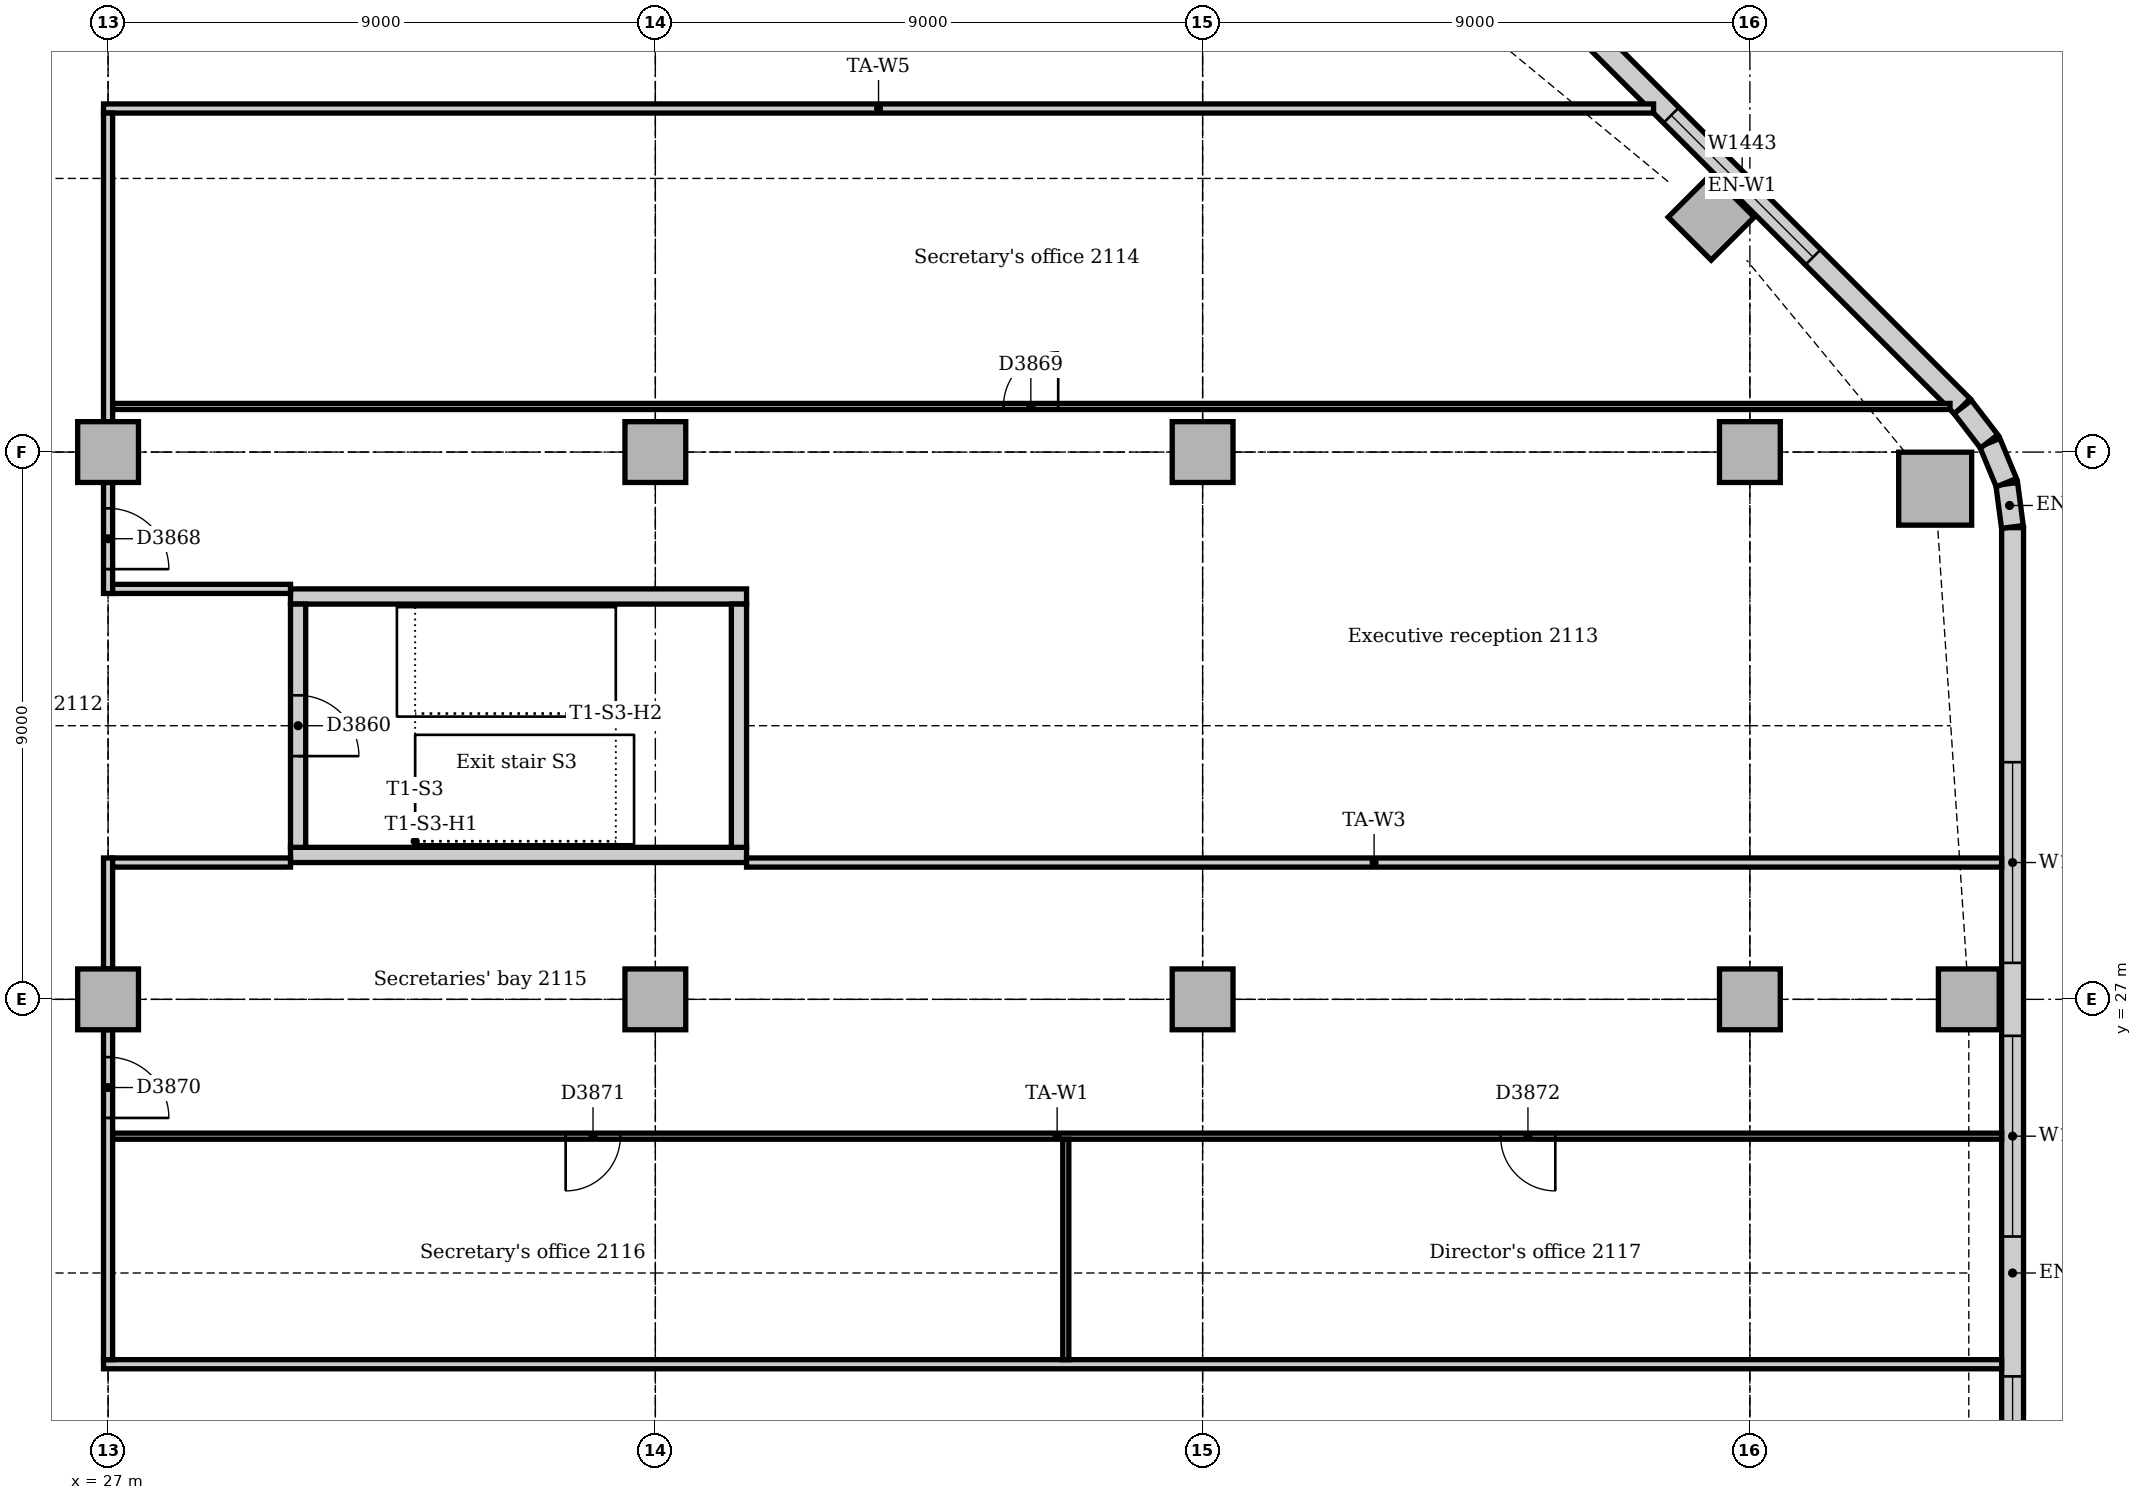
"""IFC4 building model, lengths in metres.
Left out: names, types, materials, properties, quantities, classifications, styles, units other than length and angle.
Written with IfcOpenShell. Run it as: python <this file> out.ifc"""

import sys

from ifc_helpers import new_model, si_unit, direction, frame, frame_2d, origin, origin_2d, place, context, subcontext, project, spatial, rectangle, extrude, element, fill, save


model = new_model("IFC4")
c1 = context("Model", 3, precision=1e-05, world=origin(), true_north=direction((0.0, 1.0)))
c2 = subcontext(c1, "Body", "Model", "MODEL_VIEW")
j1 = project(units=[si_unit("LENGTHUNIT", "METRE"), si_unit("PLANEANGLEUNIT", "RADIAN")], contexts=[c1])
p1 = place(None, origin())
s1 = spatial("IfcSite", under=j1, at=p1, CompositionType="ELEMENT")
p2 = place(p1, origin())
s2 = spatial("IfcBuilding", under=s1, at=p2, CompositionType="ELEMENT")
p3 = place(p2, frame((0.0, 0.0, 91.0)))
s3 = spatial("IfcBuildingStorey", under=s2, at=p3, CompositionType="ELEMENT", Elevation=91.0)
for number, where, z_axis, x_axis in (
    (1, (30.0, 29.375, 0.0), (0.0, 0.0, 1.0), (1.0, 0.0, 0.0)),
    (2, (37.5, 33.625, 0.0), (0.0, 0.0, 1.0), (-1.0, 0.0, 0.0)),
):
    element("IfcWall", number, at=place(p3, frame(where, z_axis=z_axis, x_axis=x_axis)), inside=s3, PredefinedType="SOLIDWALL", context=c2, shape_type="SweptSolid", body=[
        extrude(rectangle(XDim=7.5, YDim=0.25, at=frame_2d((3.75, 0.0))), origin(), (0.0, 0.0, 1.0), 4.0),
    ])
p4 = place(p3, frame((37.375, 29.5, 0.0), z_axis=(0.0, 0.0, 1.0), x_axis=(0.0, 1.0, 0.0)))
e3 = element("IfcWall", 3, at=p4, inside=s3, PredefinedType="SOLIDWALL", context=c2, shape_type="SweptSolid", body=[
    extrude(rectangle(XDim=4.0, YDim=0.25, at=frame_2d((2.0, 0.0))), origin(), (0.0, 0.0, 1.0), 4.0),
])
p5 = place(p3, frame((30.125, 33.5, 0.0), z_axis=(0.0, 0.0, 1.0), x_axis=(0.0, -1.0, 0.0)))
e4 = element("IfcWall", 4, at=p5, inside=s3, PredefinedType="SOLIDWALL", context=c2, shape_type="SweptSolid", body=[
    extrude(rectangle(XDim=4.0, YDim=0.25, at=frame_2d((2.0, 0.0))), origin(), (0.0, 0.0, 1.0), 4.0),
])
p6 = place(p5, frame((1.5, 0.0, 0.0)))
e5 = element("IfcOpeningElement", 5, at=p6, cuts=e4, PredefinedType="OPENING", context=c2, shape_type="SweptSolid", body=[
    extrude(rectangle(XDim=1.0, YDim=2.1, at=frame_2d((0.5, 1.05))), frame((0.0, 0.135, 0.0), z_axis=(0.0, -1.0, 0.0), x_axis=(1.0, 0.0, 0.0)), (0.0, 0.0, 1.0), 0.27),
])
p7 = place(p3, frame((57.047, 35.398, 0.0), z_axis=(0.0, 0.0, 1.0), x_axis=(1.0, 0.0, 0.0)))
e6 = element("IfcColumn", 6, at=p7, inside=s3, PredefinedType="COLUMN", context=c2, shape_type="SweptSolid", body=[
    extrude(rectangle(XDim=1.2, YDim=1.2, at=origin_2d()), origin(), (0.0, 0.0, 1.0), 3.7),
])
for number, where, z_axis, x_axis in (
    (7, (57.6, 27.0, 0.0), (0.0, 0.0, 1.0), (1.0, 0.0, 0.0)),
    (8, (53.364, 39.864, 0.0), (0.0, 0.0, 1.0), (0.707, 0.707, 0.0)),
    (9, (27.0, 27.0, 0.0), (0.0, 0.0, 1.0), (1.0, 0.0, 0.0)),
    (10, (27.0, 36.0, 0.0), (0.0, 0.0, 1.0), (1.0, 0.0, 0.0)),
    (11, (36.0, 27.0, 0.0), (0.0, 0.0, 1.0), (1.0, 0.0, 0.0)),
    (12, (36.0, 36.0, 0.0), (0.0, 0.0, 1.0), (1.0, 0.0, 0.0)),
    (13, (45.0, 27.0, 0.0), (0.0, 0.0, 1.0), (1.0, 0.0, 0.0)),
    (14, (45.0, 36.0, 0.0), (0.0, 0.0, 1.0), (1.0, 0.0, 0.0)),
    (15, (54.0, 27.0, 0.0), (0.0, 0.0, 1.0), (1.0, 0.0, 0.0)),
    (16, (54.0, 36.0, 0.0), (0.0, 0.0, 1.0), (1.0, 0.0, 0.0)),
):
    element("IfcColumn", number, at=place(p3, frame(where, z_axis=z_axis, x_axis=x_axis)), inside=s3, PredefinedType="COLUMN", context=c2, shape_type="SweptSolid", body=[
        extrude(rectangle(XDim=1.0, YDim=1.0, at=origin_2d()), origin(), (0.0, 0.0, 1.0), 3.7),
    ])
p8 = place(p3, frame((58.32, 10.243, 0.0), z_axis=(0.0, 0.0, 1.0), x_axis=(0.0, 1.0, 0.0)))
e17 = element("IfcWall", 17, at=p8, inside=s3, PredefinedType="STANDARD", context=c2, shape_type="SweptSolid", body=[
    extrude(rectangle(XDim=24.515, YDim=0.36, at=frame_2d((12.257, 0.0))), origin(), (0.0, 0.0, 1.0), 3.7),
])
p9 = place(p8, frame((3.857, 0.0, 0.9)))
e18 = element("IfcOpeningElement", 18, at=p9, cuts=e17, PredefinedType="OPENING", context=c2, shape_type="SweptSolid", body=[
    extrude(rectangle(XDim=3.3, YDim=1.6, at=frame_2d((1.65, 0.8))), frame((0.0, 0.19, 0.0), z_axis=(0.0, -1.0, 0.0), x_axis=(1.0, 0.0, 0.0)), (0.0, 0.0, 1.0), 0.38),
])
p10 = place(p8, frame((8.757, 0.0, 0.9)))
e19 = element("IfcOpeningElement", 19, at=p10, cuts=e17, PredefinedType="OPENING", context=c2, shape_type="SweptSolid", body=[
    extrude(rectangle(XDim=1.8, YDim=1.6, at=frame_2d((0.9, 0.8))), frame((0.0, 0.19, 0.0), z_axis=(0.0, -1.0, 0.0), x_axis=(1.0, 0.0, 0.0)), (0.0, 0.0, 1.0), 0.38),
])
p11 = place(p8, frame((12.857, 0.0, 0.9)))
e20 = element("IfcOpeningElement", 20, at=p11, cuts=e17, PredefinedType="OPENING", context=c2, shape_type="SweptSolid", body=[
    extrude(rectangle(XDim=3.3, YDim=1.6, at=frame_2d((1.65, 0.8))), frame((0.0, 0.19, 0.0), z_axis=(0.0, -1.0, 0.0), x_axis=(1.0, 0.0, 0.0)), (0.0, 0.0, 1.0), 0.38),
])
p12 = place(p8, frame((17.357, 0.0, 0.9)))
e21 = element("IfcOpeningElement", 21, at=p12, cuts=e17, PredefinedType="OPENING", context=c2, shape_type="SweptSolid", body=[
    extrude(rectangle(XDim=3.3, YDim=1.6, at=frame_2d((1.65, 0.8))), frame((0.0, 0.19, 0.0), z_axis=(0.0, -1.0, 0.0), x_axis=(1.0, 0.0, 0.0)), (0.0, 0.0, 1.0), 0.38),
])
p13 = place(p3, frame((57.494, 36.751, 0.0), z_axis=(0.0, 0.0, 1.0), x_axis=(-0.707106781187, 0.707106781187, 0.0)))
e22 = element("IfcWall", 22, at=p13, inside=s3, PredefinedType="STANDARD", context=c2, shape_type="SweptSolid", body=[
    extrude(rectangle(XDim=10.243, YDim=0.36, at=frame_2d((5.121, 0.0))), origin(), (0.0, 0.0, 1.0), 3.7),
])
p14 = place(p13, frame((3.471, 0.0, 0.9)))
e23 = element("IfcOpeningElement", 23, at=p14, cuts=e22, PredefinedType="OPENING", context=c2, shape_type="SweptSolid", body=[
    extrude(rectangle(XDim=3.3, YDim=1.6, at=frame_2d((1.65, 0.8))), frame((0.0, 0.19, 0.0), z_axis=(0.0, -1.0, 0.0), x_axis=(1.0, 0.0, 0.0)), (0.0, 0.0, 1.0), 0.38),
])
for number, where, z_axis, x_axis in (
    (24, (58.317, 34.769, 0.0), (0.0, 0.0, 1.0), (-0.131, 0.991, 0.0)),
    (25, (58.218, 35.497, 0.0), (0.0, 0.0, 1.0), (-0.383, 0.924, 0.0)),
):
    element("IfcWall", number, at=place(p3, frame(where, z_axis=z_axis, x_axis=x_axis)), inside=s3, PredefinedType="STANDARD", context=c2, shape_type="SweptSolid", body=[
        extrude(rectangle(XDim=0.713, YDim=0.36, at=frame_2d((0.356, 0.0))), origin(), (0.0, 0.0, 1.0), 3.7),
    ])
p15 = place(p3, frame((57.934, 36.175, 0.0), z_axis=(0.0, 0.0, 1.0), x_axis=(-0.608802368033, 0.793321924995, 0.0)))
e26 = element("IfcWall", 26, at=p15, inside=s3, PredefinedType="STANDARD", context=c2, shape_type="SweptSolid", body=[
    extrude(rectangle(XDim=0.713, YDim=0.36, at=frame_2d((0.357, 0.0))), origin(), (0.0, 0.0, 1.0), 3.7),
])
p16 = place(p3, frame((26.925, 21.0, 0.0), z_axis=(0.0, 0.0, 1.0), x_axis=(1.0, 0.0, 0.0)))
e27 = element("IfcWall", 27, at=p16, inside=s3, PredefinedType="PARTITIONING", context=c2, shape_type="SweptSolid", body=[
    extrude(rectangle(XDim=31.215, YDim=0.15, at=frame_2d((15.607, 0.0))), origin(), (0.0, 0.0, 1.0), 3.7),
])
p17 = place(p3, frame((26.925, 41.65, 0.0), z_axis=(0.0, 0.0, 1.0), x_axis=(1.0, 0.0, 0.0)))
e28 = element("IfcWall", 28, at=p17, inside=s3, PredefinedType="PARTITIONING", context=c2, shape_type="SweptSolid", body=[
    extrude(rectangle(XDim=25.491, YDim=0.15, at=frame_2d((12.745, 0.0))), origin(), (0.0, 0.0, 1.0), 3.7),
])
p18 = place(p3, frame((27.0, 21.075, 0.0), z_axis=(0.0, 0.0, 1.0), x_axis=(0.0, 1.0, 0.0)))
e29 = element("IfcWall", 29, at=p18, inside=s3, PredefinedType="PARTITIONING", context=c2, shape_type="SweptSolid", body=[
    extrude(rectangle(XDim=5.425, YDim=0.15, at=frame_2d((2.712, 0.0))), origin(), (0.0, 0.0, 1.0), 3.008),
])
p19 = place(p18, frame((3.975, 0.0, 0.0)))
e30 = element("IfcOpeningElement", 30, at=p19, cuts=e29, PredefinedType="OPENING", context=c2, shape_type="SweptSolid", body=[
    extrude(rectangle(XDim=1.0, YDim=2.1, at=frame_2d((0.5, 1.05))), frame((0.0, 0.085, 0.0), z_axis=(0.0, -1.0, 0.0), x_axis=(1.0, 0.0, 0.0)), (0.0, 0.0, 1.0), 0.17),
])
p20 = place(p3, frame((27.0, 27.5, 0.0), z_axis=(0.0, 0.0, 1.0), x_axis=(0.0, 1.0, 0.0)))
e31 = element("IfcWall", 31, at=p20, inside=s3, PredefinedType="PARTITIONING", context=c2, shape_type="SweptSolid", body=[
    extrude(rectangle(XDim=1.825, YDim=0.15, at=frame_2d((0.912, 0.0))), origin(), (0.0, 0.0, 1.0), 3.008),
])
p21 = place(p3, frame((27.0, 33.675, 0.0), z_axis=(0.0, 0.0, 1.0), x_axis=(0.0, 1.0, 0.0)))
e32 = element("IfcWall", 32, at=p21, inside=s3, PredefinedType="PARTITIONING", context=c2, shape_type="SweptSolid", body=[
    extrude(rectangle(XDim=1.825, YDim=0.15, at=frame_2d((0.912, 0.0))), origin(), (0.0, 0.0, 1.0), 3.008),
])
p22 = place(p21, frame((0.4, 0.0, 0.0)))
e33 = element("IfcOpeningElement", 33, at=p22, cuts=e32, PredefinedType="OPENING", context=c2, shape_type="SweptSolid", body=[
    extrude(rectangle(XDim=1.0, YDim=2.1, at=frame_2d((0.5, 1.05))), frame((0.0, 0.085, 0.0), z_axis=(0.0, -1.0, 0.0), x_axis=(1.0, 0.0, 0.0)), (0.0, 0.0, 1.0), 0.17),
])
p23 = place(p3, frame((27.0, 36.5, 0.0), z_axis=(0.0, 0.0, 1.0), x_axis=(0.0, 1.0, 0.0)))
e34 = element("IfcWall", 34, at=p23, inside=s3, PredefinedType="PARTITIONING", context=c2, shape_type="SweptSolid", body=[
    extrude(rectangle(XDim=5.075, YDim=0.15, at=frame_2d((2.538, 0.0))), origin(), (0.0, 0.0, 1.0), 3.008),
])
for number, where, z_axis, x_axis in (
    (35, (27.075, 29.25, 0.0), (0.0, 0.0, 1.0), (1.0, 0.0, 0.0)),
    (36, (27.075, 33.75, 0.0), (0.0, 0.0, 1.0), (1.0, 0.0, 0.0)),
):
    element("IfcWall", number, at=place(p3, frame(where, z_axis=z_axis, x_axis=x_axis)), inside=s3, PredefinedType="PARTITIONING", context=c2, shape_type="SweptSolid", body=[
        extrude(rectangle(XDim=2.925, YDim=0.15, at=frame_2d((1.462, 0.0))), origin(), (0.0, 0.0, 1.0), 3.7),
    ])
p24 = place(p3, frame((37.5, 29.25, 0.0), z_axis=(0.0, 0.0, 1.0), x_axis=(1.0, 0.0, 0.0)))
e37 = element("IfcWall", 37, at=p24, inside=s3, PredefinedType="PARTITIONING", context=c2, shape_type="SweptSolid", body=[
    extrude(rectangle(XDim=20.64, YDim=0.15, at=frame_2d((10.32, 0.0))), origin(), (0.0, 0.0, 1.0), 3.7),
])
p25 = place(p3, frame((27.075, 24.75, 0.0), z_axis=(0.0, 0.0, 1.0), x_axis=(1.0, 0.0, 0.0)))
e38 = element("IfcWall", 38, at=p25, inside=s3, PredefinedType="PARTITIONING", context=c2, shape_type="SweptSolid", body=[
    extrude(rectangle(XDim=31.065, YDim=0.1, at=frame_2d((15.533, 0.0))), origin(), (0.0, 0.0, 1.0), 3.7),
])
p26 = place(p25, frame((7.45, 0.0, 0.0)))
e39 = element("IfcOpeningElement", 39, at=p26, cuts=e38, PredefinedType="OPENING", context=c2, shape_type="SweptSolid", body=[
    extrude(rectangle(XDim=0.9, YDim=2.1, at=frame_2d((0.45, 1.05))), frame((0.0, 0.06, 0.0), z_axis=(0.0, -1.0, 0.0), x_axis=(1.0, 0.0, 0.0)), (0.0, 0.0, 1.0), 0.12),
])
p27 = place(p25, frame((22.825, 0.0, 0.0)))
e40 = element("IfcOpeningElement", 40, at=p27, cuts=e38, PredefinedType="OPENING", context=c2, shape_type="SweptSolid", body=[
    extrude(rectangle(XDim=0.9, YDim=2.1, at=frame_2d((0.45, 1.05))), frame((0.0, 0.06, 0.0), z_axis=(0.0, -1.0, 0.0), x_axis=(1.0, 0.0, 0.0)), (0.0, 0.0, 1.0), 0.12),
])
p28 = place(p3, frame((27.075, 36.75, 0.0), z_axis=(0.0, 0.0, 1.0), x_axis=(1.0, 0.0, 0.0)))
e41 = element("IfcWall", 41, at=p28, inside=s3, PredefinedType="PARTITIONING", context=c2, shape_type="SweptSolid", body=[
    extrude(rectangle(XDim=30.216, YDim=0.1, at=frame_2d((15.108, 0.0))), origin(), (0.0, 0.0, 1.0), 3.7),
])
p29 = place(p28, frame((14.65, 0.0, 0.0)))
e42 = element("IfcOpeningElement", 42, at=p29, cuts=e41, PredefinedType="OPENING", context=c2, shape_type="SweptSolid", body=[
    extrude(rectangle(XDim=0.9, YDim=2.1, at=frame_2d((0.45, 1.05))), frame((0.0, 0.06, 0.0), z_axis=(0.0, -1.0, 0.0), x_axis=(1.0, 0.0, 0.0)), (0.0, 0.0, 1.0), 0.12),
])
p30 = place(p3, frame((42.75, 21.075, 0.0), z_axis=(0.0, 0.0, 1.0), x_axis=(0.0, 1.0, 0.0)))
e43 = element("IfcWall", 43, at=p30, inside=s3, PredefinedType="PARTITIONING", context=c2, shape_type="SweptSolid", body=[
    extrude(rectangle(XDim=3.625, YDim=0.1, at=frame_2d((1.812, 0.0))), origin(), (0.0, 0.0, 1.0), 3.7),
])
p31 = place(p10, origin())
e44 = element("IfcWindow", 44, at=p31, inside=s3, PartitioningType="SINGLE_PANEL", PredefinedType="WINDOW", context=c2, shape_type="SweptSolid", body=[
    extrude(rectangle(XDim=1.8, YDim=1.6, at=frame_2d((0.9, 0.8))), frame((0.0, 0.13, 0.0), z_axis=(0.0, -1.0, 0.0), x_axis=(1.0, 0.0, 0.0)), (0.0, 0.0, 1.0), 0.06),
])
fill(e19, e44)
p32 = place(p11, origin())
e45 = element("IfcWindow", 45, at=p32, inside=s3, PartitioningType="SINGLE_PANEL", PredefinedType="WINDOW", context=c2, shape_type="SweptSolid", body=[
    extrude(rectangle(XDim=3.3, YDim=1.6, at=frame_2d((1.65, 0.8))), frame((0.0, 0.13, 0.0), z_axis=(0.0, -1.0, 0.0), x_axis=(1.0, 0.0, 0.0)), (0.0, 0.0, 1.0), 0.06),
])
fill(e20, e45)
p33 = place(p12, origin())
e46 = element("IfcWindow", 46, at=p33, inside=s3, PartitioningType="SINGLE_PANEL", PredefinedType="WINDOW", context=c2, shape_type="SweptSolid", body=[
    extrude(rectangle(XDim=3.3, YDim=1.6, at=frame_2d((1.65, 0.8))), frame((0.0, 0.13, 0.0), z_axis=(0.0, -1.0, 0.0), x_axis=(1.0, 0.0, 0.0)), (0.0, 0.0, 1.0), 0.06),
])
fill(e21, e46)
p34 = place(p14, origin())
e47 = element("IfcWindow", 47, at=p34, inside=s3, PartitioningType="SINGLE_PANEL", PredefinedType="WINDOW", context=c2, shape_type="SweptSolid", body=[
    extrude(rectangle(XDim=3.3, YDim=1.6, at=frame_2d((1.65, 0.8))), frame((0.0, 0.13, 0.0), z_axis=(0.0, -1.0, 0.0), x_axis=(1.0, 0.0, 0.0)), (0.0, 0.0, 1.0), 0.06),
])
fill(e23, e47)
p35 = place(p6, origin())
e48 = element("IfcDoor", 48, at=p35, inside=s3, OperationType="SINGLE_SWING_RIGHT", PredefinedType="DOOR", context=c2, shape_type="SweptSolid", body=[
    extrude(rectangle(XDim=1.0, YDim=2.1, at=frame_2d((0.5, 1.05))), frame((0.0, 0.025, 0.0), z_axis=(0.0, -1.0, 0.0), x_axis=(1.0, 0.0, 0.0)), (0.0, 0.0, 1.0), 0.05),
])
fill(e5, e48)
p36 = place(p22, frame((1.0, 0.0, 0.0), z_axis=(0.0, 0.0, 1.0), x_axis=(-1.0, 0.0, 0.0)))
e49 = element("IfcDoor", 49, at=p36, inside=s3, OperationType="SINGLE_SWING_RIGHT", PredefinedType="DOOR", context=c2, shape_type="SweptSolid", body=[
    extrude(rectangle(XDim=1.0, YDim=2.1, at=frame_2d((0.5, 1.05))), frame((0.0, 0.025, 0.0), z_axis=(0.0, -1.0, 0.0), x_axis=(1.0, 0.0, 0.0)), (0.0, 0.0, 1.0), 0.05),
])
fill(e33, e49)
p37 = place(p29, origin())
e50 = element("IfcDoor", 50, at=p37, inside=s3, OperationType="SINGLE_SWING_RIGHT", PredefinedType="DOOR", context=c2, shape_type="SweptSolid", body=[
    extrude(rectangle(XDim=0.9, YDim=2.1, at=frame_2d((0.45, 1.05))), frame((0.0, 0.025, 0.0), z_axis=(0.0, -1.0, 0.0), x_axis=(1.0, 0.0, 0.0)), (0.0, 0.0, 1.0), 0.05),
])
fill(e42, e50)
p38 = place(p19, frame((1.0, 0.0, 0.0), z_axis=(0.0, 0.0, 1.0), x_axis=(-1.0, 0.0, 0.0)))
e51 = element("IfcDoor", 51, at=p38, inside=s3, OperationType="SINGLE_SWING_RIGHT", PredefinedType="DOOR", context=c2, shape_type="SweptSolid", body=[
    extrude(rectangle(XDim=1.0, YDim=2.1, at=frame_2d((0.5, 1.05))), frame((0.0, 0.025, 0.0), z_axis=(0.0, -1.0, 0.0), x_axis=(1.0, 0.0, 0.0)), (0.0, 0.0, 1.0), 0.05),
])
fill(e30, e51)
p39 = place(p26, frame((0.9, 0.0, 0.0), z_axis=(0.0, 0.0, 1.0), x_axis=(-1.0, 0.0, 0.0)))
e52 = element("IfcDoor", 52, at=p39, inside=s3, OperationType="SINGLE_SWING_RIGHT", PredefinedType="DOOR", context=c2, shape_type="SweptSolid", body=[
    extrude(rectangle(XDim=0.9, YDim=2.1, at=frame_2d((0.45, 1.05))), frame((0.0, 0.025, 0.0), z_axis=(0.0, -1.0, 0.0), x_axis=(1.0, 0.0, 0.0)), (0.0, 0.0, 1.0), 0.05),
])
fill(e39, e52)
p40 = place(p27, frame((0.9, 0.0, 0.0), z_axis=(0.0, 0.0, 1.0), x_axis=(-1.0, 0.0, 0.0)))
e53 = element("IfcDoor", 53, at=p40, inside=s3, OperationType="SINGLE_SWING_LEFT", PredefinedType="DOOR", context=c2, shape_type="SweptSolid", body=[
    extrude(rectangle(XDim=0.9, YDim=2.1, at=frame_2d((0.45, 1.05))), frame((0.0, 0.025, 0.0), z_axis=(0.0, -1.0, 0.0), x_axis=(1.0, 0.0, 0.0)), (0.0, 0.0, 1.0), 0.05),
])
fill(e40, e53)
save(model, sys.argv[1])
